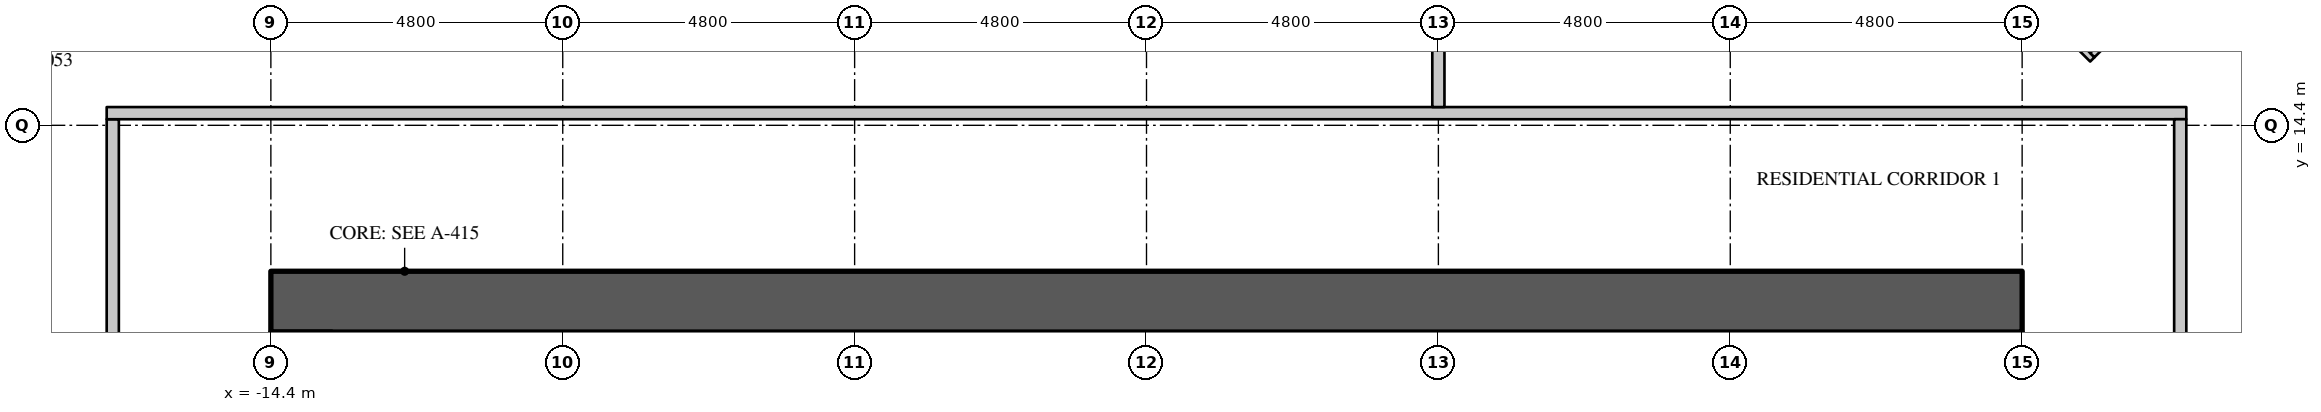
"""IFC4 building model, lengths in metres.
Left out: names, types, materials, properties, quantities, classifications, styles, units other than length and angle.
Written with IfcOpenShell. Run it as: python <this file> out.ifc"""

import sys

from ifc_helpers import new_model, si_unit, direction, frame, frame_2d, origin, place, context, subcontext, project, spatial, rectangle, extrude, element, save


model = new_model("IFC4")
c1 = context("Model", 3, precision=1e-05, world=origin(), true_north=direction((0.0, 1.0)))
c2 = subcontext(c1, "Body", "Model", "MODEL_VIEW")
j1 = project(units=[si_unit("LENGTHUNIT", "METRE"), si_unit("PLANEANGLEUNIT", "RADIAN")], contexts=[c1])
p1 = place(None, origin())
s1 = spatial("IfcSite", under=j1, at=p1, CompositionType="ELEMENT")
p2 = place(p1, origin())
s2 = spatial("IfcBuilding", under=s1, at=p2, CompositionType="ELEMENT")
p3 = place(p2, frame((0.0, 0.0, 96.9)))
s3 = spatial("IfcBuildingStorey", under=s2, at=p3, CompositionType="ELEMENT", Elevation=96.9)
p4 = place(p3, frame((-14.4, 11.5, 0.0), z_axis=(0.0, 0.0, 1.0), x_axis=(1.0, 0.0, 0.0)))
e1 = element("IfcWall", 1, at=p4, inside=s3, PredefinedType="SHEAR", context=c2, shape_type="SweptSolid", body=[
    extrude(rectangle(XDim=28.8, YDim=1.0, at=frame_2d((14.4, 0.0))), origin(), (0.0, 0.0, 1.0), 4.2),
])
p5 = place(p3, frame((-17.0, -14.5, 0.0), z_axis=(0.0, 0.0, 1.0), x_axis=(0.0, 1.0, 0.0)))
e2 = element("IfcWall", 2, at=p5, inside=s3, PredefinedType="PARTITIONING", context=c2, shape_type="SweptSolid", body=[
    extrude(rectangle(XDim=29.0, YDim=0.2, at=frame_2d((14.5, 0.0))), origin(), (0.0, 0.0, 1.0), 3.798),
])
p6 = place(p5, frame((11.55, 0.0, 0.0)))
e3 = element("IfcOpeningElement", 3, at=p6, cuts=e2, PredefinedType="OPENING", context=c2, shape_type="SweptSolid", body=[
    extrude(rectangle(XDim=1.1, YDim=2.4, at=frame_2d((0.55, 1.2))), frame((0.0, 0.11, 0.0), z_axis=(0.0, -1.0, 0.0), x_axis=(1.0, 0.0, 0.0)), (0.0, 0.0, 1.0), 0.22),
])
p7 = place(p3, frame((-17.1, 14.6, 0.0), z_axis=(0.0, 0.0, 1.0), x_axis=(1.0, 0.0, 0.0)))
e4 = element("IfcWall", 4, at=p7, inside=s3, PredefinedType="PARTITIONING", context=c2, shape_type="SweptSolid", body=[
    extrude(rectangle(XDim=34.2, YDim=0.2, at=frame_2d((17.1, 0.0))), origin(), (0.0, 0.0, 1.0), 3.798),
])
p8 = place(p3, frame((17.0, -14.5, 0.0), z_axis=(0.0, 0.0, 1.0), x_axis=(0.0, 1.0, 0.0)))
e5 = element("IfcWall", 5, at=p8, inside=s3, PredefinedType="PARTITIONING", context=c2, shape_type="SweptSolid", body=[
    extrude(rectangle(XDim=29.0, YDim=0.2, at=frame_2d((14.5, 0.0))), origin(), (0.0, 0.0, 1.0), 3.798),
])
p9 = place(p8, frame((15.9, 0.0, 0.0)))
e6 = element("IfcOpeningElement", 6, at=p9, cuts=e5, PredefinedType="OPENING", context=c2, shape_type="SweptSolid", body=[
    extrude(rectangle(XDim=1.1, YDim=2.4, at=frame_2d((0.55, 1.2))), frame((0.0, 0.11, 0.0), z_axis=(0.0, -1.0, 0.0), x_axis=(1.0, 0.0, 0.0)), (0.0, 0.0, 1.0), 0.22),
])
p10 = place(p3, frame((-22.747, 11.968, 0.0), z_axis=(0.0, 0.0, 1.0), x_axis=(0.707106781187, 0.707106781187, 0.0)))
e7 = element("IfcWall", 7, at=p10, inside=s3, PredefinedType="PARTITIONING", context=c2, shape_type="SweptSolid", body=[
    extrude(rectangle(XDim=9.913, YDim=0.15, at=frame_2d((4.957, 0.0))), origin(), (0.0, 0.0, 1.0), 3.798),
])
p11 = place(p10, frame((4.45, 0.0, 0.0)))
e8 = element("IfcOpeningElement", 8, at=p11, cuts=e7, PredefinedType="OPENING", context=c2, shape_type="SweptSolid", body=[
    extrude(rectangle(XDim=0.95, YDim=2.2, at=frame_2d((0.475, 1.1))), frame((0.0, 0.085, 0.0), z_axis=(0.0, -1.0, 0.0), x_axis=(1.0, 0.0, 0.0)), (0.0, 0.0, 1.0), 0.17),
])
p12 = place(p10, frame((8.35, 0.0, 0.0)))
e9 = element("IfcOpeningElement", 9, at=p12, cuts=e7, PredefinedType="OPENING", context=c2, shape_type="SweptSolid", body=[
    extrude(rectangle(XDim=0.95, YDim=2.2, at=frame_2d((0.475, 1.1))), frame((0.0, 0.085, 0.0), z_axis=(0.0, -1.0, 0.0), x_axis=(1.0, 0.0, 0.0)), (0.0, 0.0, 1.0), 0.17),
])
p13 = place(p3, frame((17.64, 17.64, 0.0), z_axis=(0.0, 0.0, 1.0), x_axis=(0.707106781187, -0.707106781187, 0.0)))
e10 = element("IfcWall", 10, at=p13, inside=s3, PredefinedType="PARTITIONING", context=c2, shape_type="SweptSolid", body=[
    extrude(rectangle(XDim=7.938, YDim=0.15, at=frame_2d((3.969, 0.0))), origin(), (0.0, 0.0, 1.0), 3.798),
])
p14 = place(p13, frame((6.8, 0.0, 0.0)))
e11 = element("IfcOpeningElement", 11, at=p14, cuts=e10, PredefinedType="OPENING", context=c2, shape_type="SweptSolid", body=[
    extrude(rectangle(XDim=0.95, YDim=2.2, at=frame_2d((0.475, 1.1))), frame((0.0, 0.085, 0.0), z_axis=(0.0, -1.0, 0.0), x_axis=(1.0, 0.0, 0.0)), (0.0, 0.0, 1.0), 0.17),
])
p15 = place(p13, frame((2.1, 0.0, 0.0)))
e12 = element("IfcOpeningElement", 12, at=p15, cuts=e10, PredefinedType="OPENING", context=c2, shape_type="SweptSolid", body=[
    extrude(rectangle(XDim=0.95, YDim=2.2, at=frame_2d((0.475, 1.1))), frame((0.0, 0.085, 0.0), z_axis=(0.0, -1.0, 0.0), x_axis=(1.0, 0.0, 0.0)), (0.0, 0.0, 1.0), 0.17),
])
p16 = place(p3, frame((4.8, 14.7, 0.0), z_axis=(0.0, 0.0, 1.0), x_axis=(0.0, 1.0, 0.0)))
e13 = element("IfcWall", 13, at=p16, inside=s3, PredefinedType="PARTITIONING", context=c2, shape_type="SweptSolid", body=[
    extrude(rectangle(XDim=13.2, YDim=0.2, at=frame_2d((6.6, 0.0))), origin(), (0.0, 0.0, 1.0), 3.1),
])
p17 = place(p3, frame((13.504, 17.534, 0.0), z_axis=(0.0, 0.0, 1.0), x_axis=(0.707106781187, -0.707106781187, 0.0)))
e14 = element("IfcWall", 14, at=p17, inside=s3, PredefinedType="PARTITIONING", context=c2, shape_type="SweptSolid", body=[
    extrude(rectangle(XDim=2.9, YDim=0.1, at=frame_2d((1.45, 0.0))), origin(), (0.0, 0.0, 1.0), 3.798),
])
p18 = place(p3, frame((15.554, 15.554, 0.0), z_axis=(0.0, 0.0, 1.0), x_axis=(0.707106781187, 0.707106781187, 0.0)))
e15 = element("IfcWall", 15, at=p18, inside=s3, PredefinedType="PARTITIONING", context=c2, shape_type="SweptSolid", body=[
    extrude(rectangle(XDim=2.93, YDim=0.1, at=frame_2d((1.465, 0.0))), origin(), (0.0, 0.0, 1.0), 3.798),
])
save(model, sys.argv[1])
